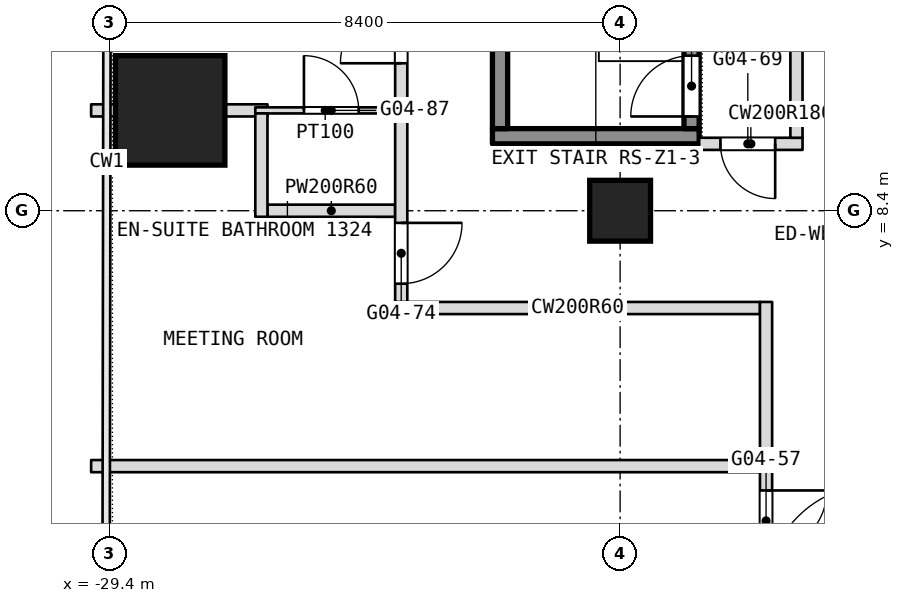
"""IFC4 building model, lengths in metres.
Left out: names, types, materials, properties, quantities, classifications, styles, units other than length and angle.
Written with IfcOpenShell. Run it as: python <this file> out.ifc"""

import sys

from ifc_helpers import new_model, si_unit, direction, frame, frame_2d, origin, origin_2d, place, context, subcontext, project, spatial, rectangle, extrude, element, fill, save


model = new_model("IFC4")
c1 = context("Model", 3, precision=1e-05, world=origin(), true_north=direction((0.0, 1.0)))
c2 = subcontext(c1, "Body", "Model", "MODEL_VIEW")
j1 = project(units=[si_unit("LENGTHUNIT", "METRE"), si_unit("PLANEANGLEUNIT", "RADIAN")], contexts=[c1])
p1 = place(None, origin())
s1 = spatial("IfcSite", under=j1, at=p1, CompositionType="ELEMENT")
p2 = place(p1, origin())
s2 = spatial("IfcBuilding", under=s1, at=p2, CompositionType="ELEMENT")
p3 = place(p2, frame((0.0, 0.0, 61.7)))
s3 = spatial("IfcBuildingStorey", under=s2, at=p3, CompositionType="ELEMENT", Elevation=61.7)
p4 = place(p3, frame((-28.4, 10.05, 0.0), z_axis=(0.0, 0.0, 1.0), x_axis=(1.0, 0.0, 0.0)))
e1 = element("IfcColumn", 1, at=p4, inside=s3, PredefinedType="COLUMN", context=c2, shape_type="SweptSolid", body=[
    extrude(rectangle(XDim=1.8, YDim=1.8, at=origin_2d()), origin(), (0.0, 0.0, 1.0), 3.6),
])
p5 = place(p3, frame((-21.0, 8.4, 0.0), z_axis=(0.0, 0.0, 1.0), x_axis=(1.0, 0.0, 0.0)))
e2 = element("IfcColumn", 2, at=p5, inside=s3, PredefinedType="COLUMN", context=c2, shape_type="SweptSolid", body=[
    extrude(rectangle(XDim=1.0, YDim=1.0, at=origin_2d()), origin(), (0.0, 0.0, 1.0), 3.6),
])
p6 = place(p3, frame((-29.7, 4.2, 0.0), z_axis=(0.0, 0.0, 1.0), x_axis=(1.0, 0.0, 0.0)))
e3 = element("IfcWall", 3, at=p6, inside=s3, PredefinedType="PARTITIONING", context=c2, shape_type="SweptSolid", body=[
    extrude(rectangle(XDim=11.0, YDim=0.2, at=frame_2d((5.5, 0.0))), origin(), (0.0, 0.0, 1.0), 3.34),
])
p7 = place(p3, frame((-24.7, 6.8, 0.0), z_axis=(0.0, 0.0, 1.0), x_axis=(1.0, 0.0, 0.0)))
e4 = element("IfcWall", 4, at=p7, inside=s3, PredefinedType="PARTITIONING", context=c2, shape_type="SweptSolid", body=[
    extrude(rectangle(XDim=6.0, YDim=0.2, at=frame_2d((3.0, 0.0))), origin(), (0.0, 0.0, 1.0), 3.34),
])
p8 = place(p3, frame((-26.8, 8.4, 0.0), z_axis=(0.0, 0.0, 1.0), x_axis=(1.0, 0.0, 0.0)))
e5 = element("IfcWall", 5, at=p8, inside=s3, PredefinedType="PARTITIONING", context=c2, shape_type="SweptSolid", body=[
    extrude(rectangle(XDim=2.1, YDim=0.2, at=frame_2d((1.05, 0.0))), origin(), (0.0, 0.0, 1.0), 2.84),
])
p9 = place(p3, frame((-19.7, 9.5, 0.0), z_axis=(0.0, 0.0, 1.0), x_axis=(1.0, 0.0, 0.0)))
e6 = element("IfcWall", 6, at=p9, inside=s3, PredefinedType="PARTITIONING", context=c2, shape_type="SweptSolid", body=[
    extrude(rectangle(XDim=1.7, YDim=0.2, at=frame_2d((0.85, 0.0))), origin(), (0.0, 0.0, 1.0), 3.34),
])
p10 = place(p9, frame((0.35, 0.0, 0.0)))
e7 = element("IfcOpeningElement", 7, at=p10, cuts=e6, PredefinedType="OPENING", context=c2, shape_type="SweptSolid", body=[
    extrude(rectangle(XDim=0.9, YDim=2.1, at=frame_2d((0.45, 1.05))), frame((0.0, 0.1, 0.0), z_axis=(0.0, -1.0, 0.0), x_axis=(1.0, 0.0, 0.0)), (0.0, 0.0, 1.0), 0.2),
])
p11 = place(p3, frame((-29.7, 10.05, 0.0), z_axis=(0.0, 0.0, 1.0), x_axis=(1.0, 0.0, 0.0)))
e8 = element("IfcWall", 8, at=p11, inside=s3, PredefinedType="PARTITIONING", context=c2, shape_type="SweptSolid", body=[
    extrude(rectangle(XDim=0.4, YDim=0.2, at=frame_2d((0.2, 0.0))), origin(), (0.0, 0.0, 1.0), 3.34),
])
p12 = place(p3, frame((-27.5, 10.05, 0.0), z_axis=(0.0, 0.0, 1.0), x_axis=(1.0, 0.0, 0.0)))
e9 = element("IfcWall", 9, at=p12, inside=s3, PredefinedType="PARTITIONING", context=c2, shape_type="SweptSolid", body=[
    extrude(rectangle(XDim=0.7, YDim=0.2, at=frame_2d((0.35, 0.0))), origin(), (0.0, 0.0, 1.0), 3.34),
])
p13 = place(p3, frame((-27.0, 10.05, 0.0), z_axis=(0.0, 0.0, 1.0), x_axis=(1.0, 0.0, 0.0)))
e10 = element("IfcWall", 10, at=p13, inside=s3, PredefinedType="PARTITIONING", context=c2, shape_type="SweptSolid", body=[
    extrude(rectangle(XDim=2.3, YDim=0.1, at=frame_2d((1.15, 0.0))), origin(), (0.0, 0.0, 1.0), 3.34),
])
p14 = place(p13, frame((0.8, 0.0, 0.0)))
e11 = element("IfcOpeningElement", 11, at=p14, cuts=e10, PredefinedType="OPENING", context=c2, shape_type="SweptSolid", body=[
    extrude(rectangle(XDim=0.9, YDim=2.1, at=frame_2d((0.45, 1.05))), frame((0.0, 0.05, 0.0), z_axis=(0.0, -1.0, 0.0), x_axis=(1.0, 0.0, 0.0)), (0.0, 0.0, 1.0), 0.1),
])
p15 = place(p3, frame((-18.1, 9.6, 0.0), z_axis=(0.0, 0.0, 1.0), x_axis=(0.0, 1.0, 0.0)))
e12 = element("IfcWall", 12, at=p15, inside=s3, PredefinedType="PARTITIONING", context=c2, shape_type="SweptSolid", body=[
    extrude(rectangle(XDim=6.2, YDim=0.2, at=frame_2d((3.1, 0.0))), origin(), (0.0, 0.0, 1.0), 3.34),
])
p16 = place(p3, frame((-18.6, -16.665, 0.0), z_axis=(0.0, 0.0, 1.0), x_axis=(0.0, 1.0, 0.0)))
e13 = element("IfcWall", 13, at=p16, inside=s3, PredefinedType="PARTITIONING", context=c2, shape_type="SweptSolid", body=[
    extrude(rectangle(XDim=23.565, YDim=0.2, at=frame_2d((11.782, 0.0))), origin(), (0.0, 0.0, 1.0), 3.34),
])
p17 = place(p16, frame((5.724, 0.0, 0.0)))
e14 = element("IfcOpeningElement", 14, at=p17, cuts=e13, PredefinedType="OPENING", context=c2, shape_type="SweptSolid", body=[
    extrude(rectangle(XDim=1.1, YDim=2.1, at=frame_2d((0.55, 1.05))), frame((0.0, 0.1, 0.0), z_axis=(0.0, -1.0, 0.0), x_axis=(1.0, 0.0, 0.0)), (0.0, 0.0, 1.0), 0.2),
])
p18 = place(p16, frame((8.665, 0.0, 0.0)))
e15 = element("IfcOpeningElement", 15, at=p18, cuts=e13, PredefinedType="OPENING", context=c2, shape_type="SweptSolid", body=[
    extrude(rectangle(XDim=1.0, YDim=2.1, at=frame_2d((0.5, 1.05))), frame((0.0, 0.1, 0.0), z_axis=(0.0, -1.0, 0.0), x_axis=(1.0, 0.0, 0.0)), (0.0, 0.0, 1.0), 0.2),
])
p19 = place(p16, frame((15.265, 0.0, 0.0)))
e16 = element("IfcOpeningElement", 16, at=p19, cuts=e13, PredefinedType="OPENING", context=c2, shape_type="SweptSolid", body=[
    extrude(rectangle(XDim=1.0, YDim=2.1, at=frame_2d((0.5, 1.05))), frame((0.0, 0.1, 0.0), z_axis=(0.0, -1.0, 0.0), x_axis=(1.0, 0.0, 0.0)), (0.0, 0.0, 1.0), 0.2),
])
p20 = place(p16, frame((19.465, 0.0, 0.0)))
e17 = element("IfcOpeningElement", 17, at=p20, cuts=e13, PredefinedType="OPENING", context=c2, shape_type="SweptSolid", body=[
    extrude(rectangle(XDim=1.0, YDim=2.1, at=frame_2d((0.5, 1.05))), frame((0.0, 0.1, 0.0), z_axis=(0.0, -1.0, 0.0), x_axis=(1.0, 0.0, 0.0)), (0.0, 0.0, 1.0), 0.2),
])
p21 = place(p3, frame((-24.6, 6.9, 0.0), z_axis=(0.0, 0.0, 1.0), x_axis=(0.0, 1.0, 0.0)))
e18 = element("IfcWall", 18, at=p21, inside=s3, PredefinedType="PARTITIONING", context=c2, shape_type="SweptSolid", body=[
    extrude(rectangle(XDim=11.6, YDim=0.2, at=frame_2d((5.8, 0.0))), origin(), (0.0, 0.0, 1.0), 3.34),
])
p22 = place(p21, frame((8.5, 0.0, 0.0)))
e19 = element("IfcOpeningElement", 19, at=p22, cuts=e18, PredefinedType="OPENING", context=c2, shape_type="SweptSolid", body=[
    extrude(rectangle(XDim=1.0, YDim=2.1, at=frame_2d((0.5, 1.05))), frame((0.0, 0.1, 0.0), z_axis=(0.0, -1.0, 0.0), x_axis=(1.0, 0.0, 0.0)), (0.0, 0.0, 1.0), 0.2),
])
p23 = place(p21, frame((10.2, 0.0, 0.0)))
e20 = element("IfcOpeningElement", 20, at=p23, cuts=e18, PredefinedType="OPENING", context=c2, shape_type="SweptSolid", body=[
    extrude(rectangle(XDim=1.0, YDim=2.1, at=frame_2d((0.5, 1.05))), frame((0.0, 0.1, 0.0), z_axis=(0.0, -1.0, 0.0), x_axis=(1.0, 0.0, 0.0)), (0.0, 0.0, 1.0), 0.2),
])
p24 = place(p21, frame((0.3, 0.0, 0.0)))
e21 = element("IfcOpeningElement", 21, at=p24, cuts=e18, PredefinedType="OPENING", context=c2, shape_type="SweptSolid", body=[
    extrude(rectangle(XDim=1.0, YDim=2.1, at=frame_2d((0.5, 1.05))), frame((0.0, 0.1, 0.0), z_axis=(0.0, -1.0, 0.0), x_axis=(1.0, 0.0, 0.0)), (0.0, 0.0, 1.0), 0.2),
])
p25 = place(p21, frame((3.925, 0.0, 0.0)))
e22 = element("IfcOpeningElement", 22, at=p25, cuts=e18, PredefinedType="OPENING", context=c2, shape_type="SweptSolid", body=[
    extrude(rectangle(XDim=1.0, YDim=2.1, at=frame_2d((0.5, 1.05))), frame((0.0, 0.1, 0.0), z_axis=(0.0, -1.0, 0.0), x_axis=(1.0, 0.0, 0.0)), (0.0, 0.0, 1.0), 0.2),
])
p26 = place(p3, frame((-26.9, 8.3, 0.0), z_axis=(0.0, 0.0, 1.0), x_axis=(0.0, 1.0, 0.0)))
e23 = element("IfcWall", 23, at=p26, inside=s3, PredefinedType="PARTITIONING", context=c2, shape_type="SweptSolid", body=[
    extrude(rectangle(XDim=1.7, YDim=0.2, at=frame_2d((0.85, 0.0))), origin(), (0.0, 0.0, 1.0), 3.34),
])
p27 = place(p3, frame((-23.1, 9.625, 0.1), z_axis=(0.0, 0.0, 1.0), x_axis=(1.0, 0.0, 0.0)))
e24 = element("IfcWall", 24, at=p27, inside=s3, PredefinedType="SHEAR", context=c2, shape_type="SweptSolid", body=[
    extrude(rectangle(XDim=3.4, YDim=0.25, at=frame_2d((1.7, 0.0))), origin(), (0.0, 0.0, 1.0), 3.6),
])
p28 = place(p3, frame((-22.975, 9.75, 0.1), z_axis=(0.0, 0.0, 1.0), x_axis=(0.0, 1.0, 0.0)))
e25 = element("IfcWall", 25, at=p28, inside=s3, PredefinedType="SHEAR", context=c2, shape_type="SweptSolid", body=[
    extrude(rectangle(XDim=5.7, YDim=0.25, at=frame_2d((2.85, 0.0))), origin(), (0.0, 0.0, 1.0), 3.6),
])
p29 = place(p3, frame((-19.825, 9.75, 0.1), z_axis=(0.0, 0.0, 1.0), x_axis=(0.0, 1.0, 0.0)))
e26 = element("IfcWall", 26, at=p29, inside=s3, PredefinedType="SHEAR", context=c2, shape_type="SweptSolid", body=[
    extrude(rectangle(XDim=5.7, YDim=0.25, at=frame_2d((2.85, 0.0))), origin(), (0.0, 0.0, 1.0), 3.6),
])
p30 = place(p29, frame((0.2, 0.0, 0.0)))
e27 = element("IfcOpeningElement", 27, at=p30, cuts=e26, PredefinedType="OPENING", context=c2, shape_type="SweptSolid", body=[
    extrude(rectangle(XDim=1.0, YDim=2.1, at=frame_2d((0.5, 1.05))), frame((0.0, 0.125, 0.0), z_axis=(0.0, -1.0, 0.0), x_axis=(1.0, 0.0, 0.0)), (0.0, 0.0, 1.0), 0.25),
])
p31 = place(p10, origin())
e28 = element("IfcDoor", 28, at=p31, inside=s3, OperationType="SINGLE_SWING_RIGHT", PredefinedType="DOOR", context=c2, shape_type="SweptSolid", body=[
    extrude(rectangle(XDim=0.9, YDim=2.1, at=frame_2d((0.45, 1.05))), frame((0.0, 0.025, 0.0), z_axis=(0.0, -1.0, 0.0), x_axis=(1.0, 0.0, 0.0)), (0.0, 0.0, 1.0), 0.05),
])
fill(e7, e28)
p32 = place(p14, origin())
e29 = element("IfcDoor", 29, at=p32, inside=s3, OperationType="SINGLE_SWING_LEFT", PredefinedType="DOOR", context=c2, shape_type="SweptSolid", body=[
    extrude(rectangle(XDim=0.9, YDim=2.1, at=frame_2d((0.45, 1.05))), frame((0.0, 0.025, 0.0), z_axis=(0.0, -1.0, 0.0), x_axis=(1.0, 0.0, 0.0)), (0.0, 0.0, 1.0), 0.05),
])
fill(e11, e29)
p33 = place(p20, origin())
e30 = element("IfcDoor", 30, at=p33, inside=s3, OperationType="SINGLE_SWING_RIGHT", PredefinedType="DOOR", context=c2, shape_type="SweptSolid", body=[
    extrude(rectangle(XDim=1.0, YDim=2.1, at=frame_2d((0.5, 1.05))), frame((0.0, 0.025, 0.0), z_axis=(0.0, -1.0, 0.0), x_axis=(1.0, 0.0, 0.0)), (0.0, 0.0, 1.0), 0.05),
])
fill(e17, e30)
p34 = place(p24, origin())
e31 = element("IfcDoor", 31, at=p34, inside=s3, OperationType="SINGLE_SWING_LEFT", PredefinedType="DOOR", context=c2, shape_type="SweptSolid", body=[
    extrude(rectangle(XDim=1.0, YDim=2.1, at=frame_2d((0.5, 1.05))), frame((0.0, 0.025, 0.0), z_axis=(0.0, -1.0, 0.0), x_axis=(1.0, 0.0, 0.0)), (0.0, 0.0, 1.0), 0.05),
])
fill(e21, e31)
p35 = place(p25, origin())
e32 = element("IfcDoor", 32, at=p35, inside=s3, OperationType="SINGLE_SWING_LEFT", PredefinedType="DOOR", context=c2, shape_type="SweptSolid", body=[
    extrude(rectangle(XDim=1.0, YDim=2.1, at=frame_2d((0.5, 1.05))), frame((0.0, 0.025, 0.0), z_axis=(0.0, -1.0, 0.0), x_axis=(1.0, 0.0, 0.0)), (0.0, 0.0, 1.0), 0.05),
])
fill(e22, e32)
p36 = place(p30, origin())
e33 = element("IfcDoor", 33, at=p36, inside=s3, OperationType="SINGLE_SWING_LEFT", PredefinedType="DOOR", context=c2, shape_type="SweptSolid", body=[
    extrude(rectangle(XDim=1.0, YDim=2.1, at=frame_2d((0.5, 1.05))), frame((0.0, 0.025, 0.0), z_axis=(0.0, -1.0, 0.0), x_axis=(1.0, 0.0, 0.0)), (0.0, 0.0, 1.0), 0.05),
])
fill(e27, e33)
save(model, sys.argv[1])
